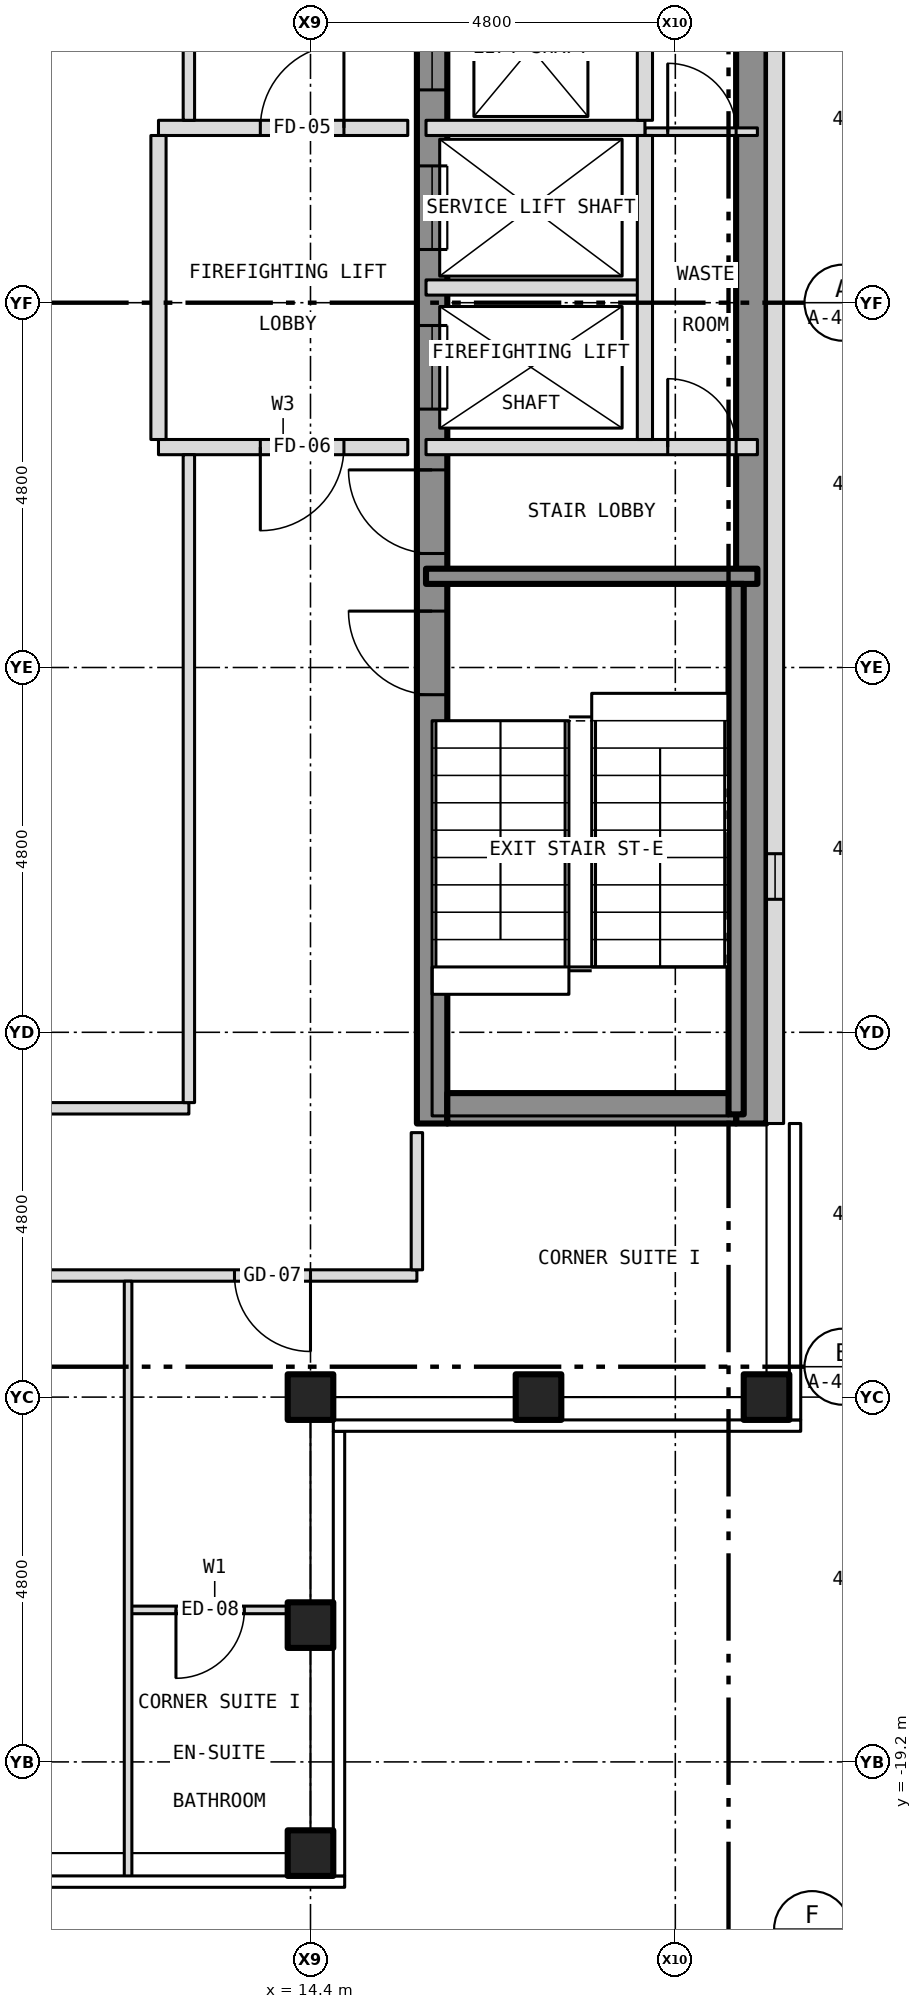
"""IFC4 building model, lengths in metres.
Left out: names, types, materials, properties, quantities, classifications, styles, units other than length and angle.
Written with IfcOpenShell. Run it as: python <this file> out.ifc"""

import sys

from ifc_helpers import new_model, si_unit, direction, frame, frame_2d, origin, origin_2d, place, context, subcontext, project, spatial, rectangle, hollow_rectangle, extrude, element, fill, save


model = new_model("IFC4")
c1 = context("Model", 3, precision=1e-05, world=origin(), true_north=direction((0.0, 1.0)))
c2 = subcontext(c1, "Body", "Model", "MODEL_VIEW")
j1 = project(units=[si_unit("LENGTHUNIT", "METRE"), si_unit("PLANEANGLEUNIT", "RADIAN")], contexts=[c1])
p1 = place(None, origin())
s1 = spatial("IfcSite", under=j1, at=p1, CompositionType="ELEMENT")
p2 = place(p1, origin())
s2 = spatial("IfcBuilding", under=s1, at=p2, CompositionType="ELEMENT")
p3 = place(p2, frame((0.0, 0.0, 251.5)))
s3 = spatial("IfcBuildingStorey", under=s2, at=p3, CompositionType="ELEMENT", Elevation=251.5)
for number, where, z_axis, x_axis in (
    (1, (14.4, -20.4, -0.15), (0.0, 0.0, 1.0), (1.0, 0.0, 0.0)),
    (2, (20.4, -14.4, -0.15), (0.0, 0.0, 1.0), (1.0, 0.0, 0.0)),
    (3, (14.4, -14.4, -0.15), (0.0, 0.0, 1.0), (1.0, 0.0, 0.0)),
    (4, (14.4, -17.4, -0.15), (0.0, 0.0, 1.0), (1.0, 0.0, 0.0)),
    (5, (17.4, -14.4, -0.15), (0.0, 0.0, 1.0), (1.0, 0.0, 0.0)),
):
    element("IfcColumn", number, at=place(p3, frame(where, z_axis=z_axis, x_axis=x_axis)), inside=s3, PredefinedType="COLUMN", context=c2, shape_type="SweptSolid", body=[
        extrude(hollow_rectangle(XDim=0.6, YDim=0.6, WallThickness=0.03, at=origin_2d()), origin(), (0.0, 0.0, 1.0), 3.5),
    ])
p4 = place(p3, frame((16.0, -10.8, 0.0), z_axis=(0.0, 0.0, 1.0), x_axis=(0.0, 1.0, 0.0)))
e6 = element("IfcWall", 6, at=p4, inside=s3, PredefinedType="SHEAR", context=c2, shape_type="SweptSolid", body=[
    extrude(rectangle(XDim=21.6, YDim=0.4, at=frame_2d((10.8, 0.0))), origin(), (0.0, 0.0, 1.0), 3.25),
])
p5 = place(p4, frame((9.4, 0.0, 0.0)))
e7 = element("IfcOpeningElement", 7, at=p5, cuts=e6, PredefinedType="OPENING", context=c2, shape_type="SweptSolid", body=[
    extrude(rectangle(XDim=1.1, YDim=2.1, at=frame_2d((0.55, 1.05))), frame((0.0, 0.212, 0.0), z_axis=(0.0, -1.0, 0.0), x_axis=(1.0, 0.0, 0.0)), (0.0, 0.0, 1.0), 0.424),
])
p6 = place(p4, frame((11.5, 0.0, 0.0)))
e8 = element("IfcOpeningElement", 8, at=p6, cuts=e6, PredefinedType="OPENING", context=c2, shape_type="SweptSolid", body=[
    extrude(rectangle(XDim=1.1, YDim=2.1, at=frame_2d((0.55, 1.05))), frame((0.0, 0.212, 0.0), z_axis=(0.0, -1.0, 0.0), x_axis=(1.0, 0.0, 0.0)), (0.0, 0.0, 1.0), 0.424),
])
p7 = place(p4, frame((13.6, 0.0, 0.0)))
e9 = element("IfcOpeningElement", 9, at=p7, cuts=e6, PredefinedType="OPENING", context=c2, shape_type="SweptSolid", body=[
    extrude(rectangle(XDim=1.1, YDim=2.1, at=frame_2d((0.55, 1.05))), frame((0.0, 0.212, 0.0), z_axis=(0.0, -1.0, 0.0), x_axis=(1.0, 0.0, 0.0)), (0.0, 0.0, 1.0), 0.424),
])
p8 = place(p4, frame((15.7, 0.0, 0.0)))
e10 = element("IfcOpeningElement", 10, at=p8, cuts=e6, PredefinedType="OPENING", context=c2, shape_type="SweptSolid", body=[
    extrude(rectangle(XDim=1.1, YDim=2.1, at=frame_2d((0.55, 1.05))), frame((0.0, 0.212, 0.0), z_axis=(0.0, -1.0, 0.0), x_axis=(1.0, 0.0, 0.0)), (0.0, 0.0, 1.0), 0.424),
])
p9 = place(p4, frame((17.8, 0.0, 0.0)))
e11 = element("IfcOpeningElement", 11, at=p9, cuts=e6, PredefinedType="OPENING", context=c2, shape_type="SweptSolid", body=[
    extrude(rectangle(XDim=1.1, YDim=2.1, at=frame_2d((0.55, 1.05))), frame((0.0, 0.212, 0.0), z_axis=(0.0, -1.0, 0.0), x_axis=(1.0, 0.0, 0.0)), (0.0, 0.0, 1.0), 0.424),
])
p10 = place(p4, frame((5.642, 0.0, 0.0)))
e12 = element("IfcOpeningElement", 12, at=p10, cuts=e6, PredefinedType="OPENING", context=c2, shape_type="SweptSolid", body=[
    extrude(rectangle(XDim=1.1, YDim=2.1, at=frame_2d((0.55, 1.05))), frame((0.0, 0.212, 0.0), z_axis=(0.0, -1.0, 0.0), x_axis=(1.0, 0.0, 0.0)), (0.0, 0.0, 1.0), 0.424),
])
p11 = place(p4, frame((7.5, 0.0, 0.0)))
e13 = element("IfcOpeningElement", 13, at=p11, cuts=e6, PredefinedType="OPENING", context=c2, shape_type="SweptSolid", body=[
    extrude(rectangle(XDim=1.1, YDim=2.1, at=frame_2d((0.55, 1.05))), frame((0.0, 0.212, 0.0), z_axis=(0.0, -1.0, 0.0), x_axis=(1.0, 0.0, 0.0)), (0.0, 0.0, 1.0), 0.424),
])
p12 = place(p4, frame((20.0, 0.0, 0.0)))
e14 = element("IfcOpeningElement", 14, at=p12, cuts=e6, PredefinedType="OPENING", context=c2, shape_type="SweptSolid", body=[
    extrude(rectangle(XDim=0.9, YDim=2.1, at=frame_2d((0.45, 1.05))), frame((0.0, 0.212, 0.0), z_axis=(0.0, -1.0, 0.0), x_axis=(1.0, 0.0, 0.0)), (0.0, 0.0, 1.0), 0.424),
])
p13 = place(p3, frame((20.2, -10.8, 0.0), z_axis=(0.0, 0.0, 1.0), x_axis=(0.0, 1.0, 0.0)))
e15 = element("IfcWall", 15, at=p13, inside=s3, PredefinedType="SHEAR", context=c2, shape_type="SweptSolid", body=[
    extrude(rectangle(XDim=21.6, YDim=0.4, at=frame_2d((10.8, 0.0))), origin(), (0.0, 0.0, 1.0), 3.25),
])
p14 = place(p3, frame((16.2, -10.6, 0.0), z_axis=(0.0, 0.0, 1.0), x_axis=(1.0, 0.0, 0.0)))
e16 = element("IfcWall", 16, at=p14, inside=s3, PredefinedType="SHEAR", context=c2, shape_type="SweptSolid", body=[
    extrude(rectangle(XDim=3.8, YDim=0.4, at=frame_2d((1.9, 0.0))), origin(), (0.0, 0.0, 1.0), 3.25),
])
p15 = place(p3, frame((20.512, -10.8, 0.0), z_axis=(0.0, 0.0, 1.0), x_axis=(0.0, 1.0, 0.0)))
e17 = element("IfcWall", 17, at=p15, inside=s3, PredefinedType="SOLIDWALL", context=c2, shape_type="SweptSolid", body=[
    extrude(rectangle(XDim=21.6, YDim=0.225, at=frame_2d((10.8, 0.0))), origin(), (0.0, 0.0, 1.0), 3.5),
])
p16 = place(p15, frame((2.95, 0.0, 1.0)))
e18 = element("IfcOpeningElement", 18, at=p16, cuts=e17, PredefinedType="OPENING", context=c2, shape_type="SweptSolid", body=[
    extrude(rectangle(XDim=0.6, YDim=1.5, at=frame_2d((0.3, 0.75))), frame((0.0, 0.125, 0.0), z_axis=(0.0, -1.0, 0.0), x_axis=(1.0, 0.0, 0.0)), (0.0, 0.0, 1.0), 0.249),
])
p17 = place(p3, frame((12.0, -17.2, 0.0), z_axis=(0.0, 0.0, 1.0), x_axis=(1.0, 0.0, 0.0)))
e19 = element("IfcWall", 19, at=p17, inside=s3, PredefinedType="PARTITIONING", context=c2, shape_type="SweptSolid", body=[
    extrude(rectangle(XDim=2.28, YDim=0.1, at=frame_2d((1.14, 0.0))), origin(), (0.0, 0.0, 1.0), 3.35),
])
p18 = place(p17, frame((0.63, 0.0, 0.0)))
e20 = element("IfcOpeningElement", 20, at=p18, cuts=e19, PredefinedType="OPENING", context=c2, shape_type="SweptSolid", body=[
    extrude(rectangle(XDim=0.9, YDim=2.1, at=frame_2d((0.45, 1.05))), frame((0.0, 0.062, 0.0), z_axis=(0.0, -1.0, 0.0), x_axis=(1.0, 0.0, 0.0)), (0.0, 0.0, 1.0), 0.124),
])
p19 = place(p3, frame((-15.8, -12.8, 0.0), z_axis=(0.0, 0.0, 1.0), x_axis=(1.0, 0.0, 0.0)))
e21 = element("IfcWall", 21, at=p19, inside=s3, PredefinedType="PARTITIONING", context=c2, shape_type="SweptSolid", body=[
    extrude(rectangle(XDim=31.6, YDim=0.15, at=frame_2d((15.8, 0.0))), origin(), (0.0, 0.0, 1.0), 3.35),
])
p20 = place(p19, frame((10.55, 0.0, 0.0)))
e22 = element("IfcOpeningElement", 22, at=p20, cuts=e21, PredefinedType="OPENING", context=c2, shape_type="SweptSolid", body=[
    extrude(rectangle(XDim=0.9, YDim=2.1, at=frame_2d((0.45, 1.05))), frame((0.0, 0.087, 0.0), z_axis=(0.0, -1.0, 0.0), x_axis=(1.0, 0.0, 0.0)), (0.0, 0.0, 1.0), 0.174),
])
p21 = place(p19, frame((19.0, 0.0, 0.0)))
e23 = element("IfcOpeningElement", 23, at=p21, cuts=e21, PredefinedType="OPENING", context=c2, shape_type="SweptSolid", body=[
    extrude(rectangle(XDim=1.0, YDim=2.1, at=frame_2d((0.5, 1.05))), frame((0.0, 0.087, 0.0), z_axis=(0.0, -1.0, 0.0), x_axis=(1.0, 0.0, 0.0)), (0.0, 0.0, 1.0), 0.174),
])
p22 = place(p19, frame((24.95, 0.0, 0.0)))
e24 = element("IfcOpeningElement", 24, at=p22, cuts=e21, PredefinedType="OPENING", context=c2, shape_type="SweptSolid", body=[
    extrude(rectangle(XDim=0.9, YDim=2.1, at=frame_2d((0.45, 1.05))), frame((0.0, 0.087, 0.0), z_axis=(0.0, -1.0, 0.0), x_axis=(1.0, 0.0, 0.0)), (0.0, 0.0, 1.0), 0.174),
])
p23 = place(p19, frame((1.4, 0.0, 0.0)))
e25 = element("IfcOpeningElement", 25, at=p23, cuts=e21, PredefinedType="OPENING", context=c2, shape_type="SweptSolid", body=[
    extrude(rectangle(XDim=1.0, YDim=2.1, at=frame_2d((0.5, 1.05))), frame((0.0, 0.087, 0.0), z_axis=(0.0, -1.0, 0.0), x_axis=(1.0, 0.0, 0.0)), (0.0, 0.0, 1.0), 0.174),
])
p24 = place(p19, frame((29.2, 0.0, 0.0)))
e26 = element("IfcOpeningElement", 26, at=p24, cuts=e21, PredefinedType="OPENING", context=c2, shape_type="SweptSolid", body=[
    extrude(rectangle(XDim=1.0, YDim=2.1, at=frame_2d((0.5, 1.05))), frame((0.0, 0.087, 0.0), z_axis=(0.0, -1.0, 0.0), x_axis=(1.0, 0.0, 0.0)), (0.0, 0.0, 1.0), 0.174),
])
p25 = place(p3, frame((4.8, -10.6, 0.0), z_axis=(0.0, 0.0, 1.0), x_axis=(1.0, 0.0, 0.0)))
e27 = element("IfcWall", 27, at=p25, inside=s3, PredefinedType="PARTITIONING", context=c2, shape_type="SweptSolid", body=[
    extrude(rectangle(XDim=8.0, YDim=0.15, at=frame_2d((4.0, 0.0))), origin(), (0.0, 0.0, 1.0), 3.35),
])
p26 = place(p3, frame((15.92, -3.6, 0.0), z_axis=(0.0, 0.0, 1.0), x_axis=(1.0, 0.0, 0.0)))
e28 = element("IfcWall", 28, at=p26, inside=s3, PredefinedType="SHEAR", context=c2, shape_type="SweptSolid", body=[
    extrude(rectangle(XDim=4.36, YDim=0.2, at=frame_2d((2.18, 0.0))), origin(), (0.0, 0.0, 1.0), 3.25),
])
p27 = place(p3, frame((12.4, -1.9, 0.0), z_axis=(0.0, 0.0, 1.0), x_axis=(1.0, 0.0, 0.0)))
e29 = element("IfcWall", 29, at=p27, inside=s3, PredefinedType="PARTITIONING", context=c2, shape_type="SweptSolid", body=[
    extrude(rectangle(XDim=3.28, YDim=0.2, at=frame_2d((1.64, 0.0))), origin(), (0.0, 0.0, 1.0), 3.35),
])
p28 = place(p27, frame((1.34, 0.0, 0.0)))
e30 = element("IfcOpeningElement", 30, at=p28, cuts=e29, PredefinedType="OPENING", context=c2, shape_type="SweptSolid", body=[
    extrude(rectangle(XDim=1.1, YDim=2.1, at=frame_2d((0.55, 1.05))), frame((0.0, 0.112, 0.0), z_axis=(0.0, -1.0, 0.0), x_axis=(1.0, 0.0, 0.0)), (0.0, 0.0, 1.0), 0.224),
])
p29 = place(p3, frame((15.92, -1.9, 0.0), z_axis=(0.0, 0.0, 1.0), x_axis=(1.0, 0.0, 0.0)))
e31 = element("IfcWall", 31, at=p29, inside=s3, PredefinedType="PARTITIONING", context=c2, shape_type="SweptSolid", body=[
    extrude(rectangle(XDim=4.36, YDim=0.2, at=frame_2d((2.18, 0.0))), origin(), (0.0, 0.0, 1.0), 3.25),
])
p30 = place(p29, frame((3.18, 0.0, 0.0)))
e32 = element("IfcOpeningElement", 32, at=p30, cuts=e31, PredefinedType="OPENING", context=c2, shape_type="SweptSolid", body=[
    extrude(rectangle(XDim=0.9, YDim=2.1, at=frame_2d((0.45, 1.05))), frame((0.0, 0.112, 0.0), z_axis=(0.0, -1.0, 0.0), x_axis=(1.0, 0.0, 0.0)), (0.0, 0.0, 1.0), 0.224),
])
p31 = place(p3, frame((15.92, 0.2, 0.0), z_axis=(0.0, 0.0, 1.0), x_axis=(1.0, 0.0, 0.0)))
e33 = element("IfcWall", 33, at=p31, inside=s3, PredefinedType="PARTITIONING", context=c2, shape_type="SweptSolid", body=[
    extrude(rectangle(XDim=2.88, YDim=0.2, at=frame_2d((1.44, 0.0))), origin(), (0.0, 0.0, 1.0), 3.25),
])
p32 = place(p3, frame((18.8, 2.25, 0.0), z_axis=(0.0, 0.0, 1.0), x_axis=(1.0, 0.0, 0.0)))
e34 = element("IfcWall", 34, at=p32, inside=s3, PredefinedType="PARTITIONING", context=c2, shape_type="SweptSolid", body=[
    extrude(rectangle(XDim=1.48, YDim=0.1, at=frame_2d((0.74, 0.0))), origin(), (0.0, 0.0, 1.0), 3.25),
])
p33 = place(p32, frame((0.3, 0.0, 0.0)))
e35 = element("IfcOpeningElement", 35, at=p33, cuts=e34, PredefinedType="OPENING", context=c2, shape_type="SweptSolid", body=[
    extrude(rectangle(XDim=0.9, YDim=2.1, at=frame_2d((0.45, 1.05))), frame((0.0, 0.062, 0.0), z_axis=(0.0, -1.0, 0.0), x_axis=(1.0, 0.0, 0.0)), (0.0, 0.0, 1.0), 0.124),
])
p34 = place(p3, frame((12.4, 2.3, 0.0), z_axis=(0.0, 0.0, 1.0), x_axis=(1.0, 0.0, 0.0)))
e36 = element("IfcWall", 36, at=p34, inside=s3, PredefinedType="PARTITIONING", context=c2, shape_type="SweptSolid", body=[
    extrude(rectangle(XDim=3.28, YDim=0.2, at=frame_2d((1.64, 0.0))), origin(), (0.0, 0.0, 1.0), 3.35),
])
p35 = place(p34, frame((1.34, 0.0, 0.0)))
e37 = element("IfcOpeningElement", 37, at=p35, cuts=e36, PredefinedType="OPENING", context=c2, shape_type="SweptSolid", body=[
    extrude(rectangle(XDim=1.1, YDim=2.1, at=frame_2d((0.55, 1.05))), frame((0.0, 0.112, 0.0), z_axis=(0.0, -1.0, 0.0), x_axis=(1.0, 0.0, 0.0)), (0.0, 0.0, 1.0), 0.224),
])
p36 = place(p3, frame((15.92, 2.3, 0.0), z_axis=(0.0, 0.0, 1.0), x_axis=(1.0, 0.0, 0.0)))
e38 = element("IfcWall", 38, at=p36, inside=s3, PredefinedType="PARTITIONING", context=c2, shape_type="SweptSolid", body=[
    extrude(rectangle(XDim=2.88, YDim=0.2, at=frame_2d((1.44, 0.0))), origin(), (0.0, 0.0, 1.0), 3.25),
])
p37 = place(p3, frame((12.0, -20.73, 0.0), z_axis=(0.0, 0.0, 1.0), x_axis=(0.0, 1.0, 0.0)))
e39 = element("IfcWall", 39, at=p37, inside=s3, PredefinedType="PARTITIONING", context=c2, shape_type="SweptSolid", body=[
    extrude(rectangle(XDim=7.855, YDim=0.1, at=frame_2d((3.927, 0.0))), origin(), (0.0, 0.0, 1.0), 3.35),
])
p38 = place(p3, frame((12.4, -1.8, 0.0), z_axis=(0.0, 0.0, 1.0), x_axis=(0.0, 1.0, 0.0)))
e40 = element("IfcWall", 40, at=p38, inside=s3, PredefinedType="PARTITIONING", context=c2, shape_type="SweptSolid", body=[
    extrude(rectangle(XDim=4.0, YDim=0.2, at=frame_2d((2.0, 0.0))), origin(), (0.0, 0.0, 1.0), 3.35),
])
p39 = place(p3, frame((12.8, -10.525, 0.0), z_axis=(0.0, 0.0, 1.0), x_axis=(0.0, 1.0, 0.0)))
e41 = element("IfcWall", 41, at=p39, inside=s3, PredefinedType="PARTITIONING", context=c2, shape_type="SweptSolid", body=[
    extrude(rectangle(XDim=8.525, YDim=0.15, at=frame_2d((4.262, 0.0))), origin(), (0.0, 0.0, 1.0), 3.35),
])
p40 = place(p3, frame((12.8, 2.4, 0.0), z_axis=(0.0, 0.0, 1.0), x_axis=(0.0, 1.0, 0.0)))
e42 = element("IfcWall", 42, at=p40, inside=s3, PredefinedType="PARTITIONING", context=c2, shape_type="SweptSolid", body=[
    extrude(rectangle(XDim=3.425, YDim=0.15, at=frame_2d((1.712, 0.0))), origin(), (0.0, 0.0, 1.0), 3.35),
])
p41 = place(p3, frame((15.8, -12.725, 0.0), z_axis=(0.0, 0.0, 1.0), x_axis=(0.0, 1.0, 0.0)))
e43 = element("IfcWall", 43, at=p41, inside=s3, PredefinedType="PARTITIONING", context=c2, shape_type="SweptSolid", body=[
    extrude(rectangle(XDim=1.805, YDim=0.15, at=frame_2d((0.903, 0.0))), origin(), (0.0, 0.0, 1.0), 3.35),
])
for number, where, z_axis, x_axis in (
    (44, (18.8, -1.8, 0.0), (0.0, 0.0, 1.0), (0.0, 1.0, 0.0)),
    (45, (18.8, 2.4, 0.0), (0.0, 0.0, 1.0), (0.0, 1.0, 0.0)),
):
    element("IfcWall", number, at=place(p3, frame(where, z_axis=z_axis, x_axis=x_axis)), inside=s3, PredefinedType="PARTITIONING", context=c2, shape_type="SweptSolid", body=[
        extrude(rectangle(XDim=4.0, YDim=0.2, at=frame_2d((2.0, 0.0))), origin(), (0.0, 0.0, 1.0), 3.25),
    ])
p42 = place(p3, frame((20.0, -10.68, 0.0), z_axis=(0.0, 0.0, 1.0), x_axis=(0.0, 1.0, 0.0)))
e46 = element("IfcWall", 46, at=p42, inside=s3, PredefinedType="SHEAR", context=c2, shape_type="SweptSolid", body=[
    extrude(rectangle(XDim=6.98, YDim=0.2, at=frame_2d((3.49, 0.0))), origin(), (0.0, 0.0, 1.0), 3.25),
])
p43 = place(p16, origin())
e47 = element("IfcWindow", 47, at=p43, inside=s3, PartitioningType="SINGLE_PANEL", PredefinedType="WINDOW", context=c2, shape_type="SweptSolid", body=[
    extrude(rectangle(XDim=0.6, YDim=1.5, at=frame_2d((0.3, 0.75))), frame((0.0, -0.022, 0.0), z_axis=(0.0, -1.0, 0.0), x_axis=(1.0, 0.0, 0.0)), (0.0, 0.0, 1.0), 0.06),
])
fill(e18, e47)
p44 = place(p5, origin())
e48 = element("IfcDoor", 48, at=p44, inside=s3, OperationType="SLIDING_TO_LEFT", PredefinedType="DOOR", context=c2, shape_type="SweptSolid", body=[
    extrude(rectangle(XDim=1.1, YDim=2.1, at=frame_2d((0.55, 1.05))), frame((0.0, 0.025, 0.0), z_axis=(0.0, -1.0, 0.0), x_axis=(1.0, 0.0, 0.0)), (0.0, 0.0, 1.0), 0.05),
])
fill(e7, e48)
p45 = place(p6, origin())
e49 = element("IfcDoor", 49, at=p45, inside=s3, OperationType="SLIDING_TO_LEFT", PredefinedType="DOOR", context=c2, shape_type="SweptSolid", body=[
    extrude(rectangle(XDim=1.1, YDim=2.1, at=frame_2d((0.55, 1.05))), frame((0.0, 0.025, 0.0), z_axis=(0.0, -1.0, 0.0), x_axis=(1.0, 0.0, 0.0)), (0.0, 0.0, 1.0), 0.05),
])
fill(e8, e49)
p46 = place(p7, origin())
e50 = element("IfcDoor", 50, at=p46, inside=s3, OperationType="SLIDING_TO_LEFT", PredefinedType="DOOR", context=c2, shape_type="SweptSolid", body=[
    extrude(rectangle(XDim=1.1, YDim=2.1, at=frame_2d((0.55, 1.05))), frame((0.0, 0.025, 0.0), z_axis=(0.0, -1.0, 0.0), x_axis=(1.0, 0.0, 0.0)), (0.0, 0.0, 1.0), 0.05),
])
fill(e9, e50)
p47 = place(p10, origin())
e51 = element("IfcDoor", 51, at=p47, inside=s3, OperationType="SINGLE_SWING_RIGHT", PredefinedType="DOOR", context=c2, shape_type="SweptSolid", body=[
    extrude(rectangle(XDim=1.1, YDim=2.1, at=frame_2d((0.55, 1.05))), frame((0.0, 0.025, 0.0), z_axis=(0.0, -1.0, 0.0), x_axis=(1.0, 0.0, 0.0)), (0.0, 0.0, 1.0), 0.05),
])
fill(e12, e51)
p48 = place(p11, origin())
e52 = element("IfcDoor", 52, at=p48, inside=s3, OperationType="SINGLE_SWING_RIGHT", PredefinedType="DOOR", context=c2, shape_type="SweptSolid", body=[
    extrude(rectangle(XDim=1.1, YDim=2.1, at=frame_2d((0.55, 1.05))), frame((0.0, 0.025, 0.0), z_axis=(0.0, -1.0, 0.0), x_axis=(1.0, 0.0, 0.0)), (0.0, 0.0, 1.0), 0.05),
])
fill(e13, e52)
p49 = place(p30, origin())
e53 = element("IfcDoor", 53, at=p49, inside=s3, OperationType="SINGLE_SWING_LEFT", PredefinedType="DOOR", context=c2, shape_type="SweptSolid", body=[
    extrude(rectangle(XDim=0.9, YDim=2.1, at=frame_2d((0.45, 1.05))), frame((0.0, 0.025, 0.0), z_axis=(0.0, -1.0, 0.0), x_axis=(1.0, 0.0, 0.0)), (0.0, 0.0, 1.0), 0.05),
])
fill(e32, e53)
p50 = place(p33, origin())
e54 = element("IfcDoor", 54, at=p50, inside=s3, OperationType="SINGLE_SWING_LEFT", PredefinedType="DOOR", context=c2, shape_type="SweptSolid", body=[
    extrude(rectangle(XDim=0.9, YDim=2.1, at=frame_2d((0.45, 1.05))), frame((0.0, 0.025, 0.0), z_axis=(0.0, -1.0, 0.0), x_axis=(1.0, 0.0, 0.0)), (0.0, 0.0, 1.0), 0.05),
])
fill(e35, e54)
p51 = place(p35, origin())
e55 = element("IfcDoor", 55, at=p51, inside=s3, OperationType="SINGLE_SWING_RIGHT", PredefinedType="DOOR", context=c2, shape_type="SweptSolid", body=[
    extrude(rectangle(XDim=1.1, YDim=2.1, at=frame_2d((0.55, 1.05))), frame((0.0, 0.025, 0.0), z_axis=(0.0, -1.0, 0.0), x_axis=(1.0, 0.0, 0.0)), (0.0, 0.0, 1.0), 0.05),
])
fill(e37, e55)
p52 = place(p28, origin())
e56 = element("IfcDoor", 56, at=p52, inside=s3, OperationType="SINGLE_SWING_LEFT", PredefinedType="DOOR", context=c2, shape_type="SweptSolid", body=[
    extrude(rectangle(XDim=1.1, YDim=2.1, at=frame_2d((0.55, 1.05))), frame((0.0, 0.025, 0.0), z_axis=(0.0, -1.0, 0.0), x_axis=(1.0, 0.0, 0.0)), (0.0, 0.0, 1.0), 0.05),
])
fill(e30, e56)
p53 = place(p18, origin())
e57 = element("IfcDoor", 57, at=p53, inside=s3, OperationType="SINGLE_SWING_LEFT", PredefinedType="DOOR", context=c2, shape_type="SweptSolid", body=[
    extrude(rectangle(XDim=0.9, YDim=2.1, at=frame_2d((0.45, 1.05))), frame((0.0, 0.025, 0.0), z_axis=(0.0, -1.0, 0.0), x_axis=(1.0, 0.0, 0.0)), (0.0, 0.0, 1.0), 0.05),
])
fill(e20, e57)
p54 = place(p24, origin())
e58 = element("IfcDoor", 58, at=p54, inside=s3, OperationType="SINGLE_SWING_RIGHT", PredefinedType="DOOR", context=c2, shape_type="SweptSolid", body=[
    extrude(rectangle(XDim=1.0, YDim=2.1, at=frame_2d((0.5, 1.05))), frame((0.0, 0.025, 0.0), z_axis=(0.0, -1.0, 0.0), x_axis=(1.0, 0.0, 0.0)), (0.0, 0.0, 1.0), 0.05),
])
fill(e26, e58)
save(model, sys.argv[1])
